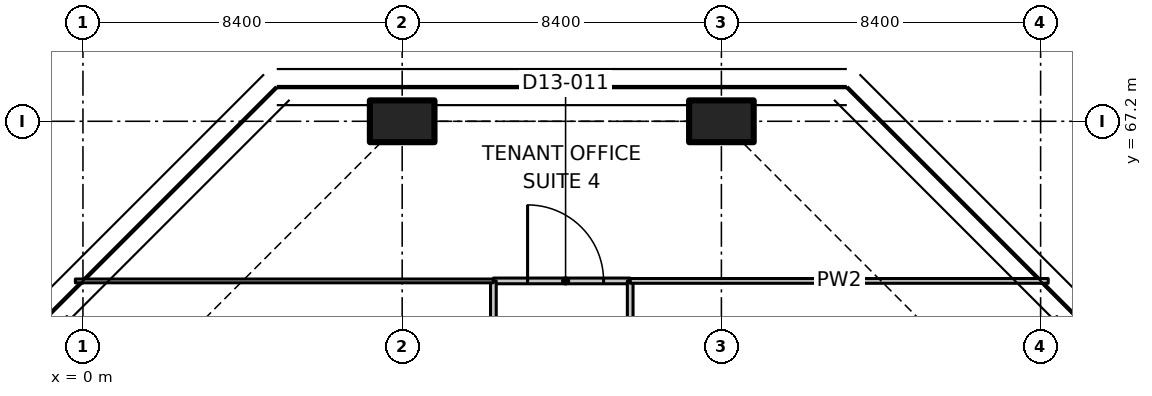
"""IFC4 building model, lengths in metres.
Left out: names, types, materials, properties, quantities, classifications, styles, units other than length and angle.
Written with IfcOpenShell. Run it as: python <this file> out.ifc"""

import sys

from ifc_helpers import new_model, si_unit, direction, frame, frame_2d, origin, origin_2d, place, context, subcontext, project, spatial, polyline, rectangle, outline, extrude, element, fill, save


model = new_model("IFC4")
c1 = context("Model", 3, precision=1e-05, world=origin(), true_north=direction((0.0, 1.0)))
c2 = subcontext(c1, "Body", "Model", "MODEL_VIEW")
j1 = project(units=[si_unit("LENGTHUNIT", "METRE"), si_unit("PLANEANGLEUNIT", "RADIAN")], contexts=[c1])
p1 = place(None, origin())
s1 = spatial("IfcSite", under=j1, at=p1, CompositionType="ELEMENT")
p2 = place(p1, origin())
s2 = spatial("IfcBuilding", under=s1, at=p2, CompositionType="ELEMENT")
p3 = place(p2, frame((0.0, 0.0, 98.9)))
s3 = spatial("IfcBuildingStorey", under=s2, at=p3, CompositionType="ELEMENT", Elevation=98.9)
for number, where, z_axis, x_axis in (
    (1, (8.4, 67.2, 0.0), (0.0, 0.0, 1.0), (0.0, 1.0, 0.0)),
    (2, (16.8, 67.2, 0.0), (0.0, 0.0, 1.0), (0.0, 1.0, 0.0)),
):
    element("IfcColumn", number, at=place(p3, frame(where, z_axis=z_axis, x_axis=x_axis)), inside=s3, PredefinedType="COLUMN", context=c2, shape_type="SweptSolid", body=[
        extrude(rectangle(XDim=1.1, YDim=1.7, at=origin_2d()), origin(), (0.0, 0.0, 1.0), 3.35),
    ])
p4 = place(p3, frame((10.8, 63.0, 0.0), z_axis=(0.0, 0.0, 1.0), x_axis=(1.0, 0.0, 0.0)))
e3 = element("IfcWall", 3, at=p4, inside=s3, PredefinedType="PARTITIONING", context=c2, shape_type="SweptSolid", body=[
    extrude(rectangle(XDim=3.6, YDim=0.15, at=frame_2d((1.8, 0.0))), origin(), (0.0, 0.0, 1.0), 3.33),
])
p5 = place(p4, frame((0.9, 0.0, 0.0)))
e4 = element("IfcOpeningElement", 4, at=p5, cuts=e3, PredefinedType="OPENING", context=c2, shape_type="SweptSolid", body=[
    extrude(rectangle(XDim=2.0, YDim=2.4, at=frame_2d((1.0, 1.2))), frame((0.0, 0.085, 0.0), z_axis=(0.0, -1.0, 0.0), x_axis=(1.0, 0.0, 0.0)), (0.0, 0.0, 1.0), 0.17),
])
p6 = place(p3, frame((10.8, 54.6, 0.0), z_axis=(0.0, 0.0, 1.0), x_axis=(0.0, 1.0, 0.0)))
e5 = element("IfcWall", 5, at=p6, inside=s3, PredefinedType="PARTITIONING", context=c2, shape_type="SweptSolid", body=[
    extrude(rectangle(XDim=8.4, YDim=0.15, at=frame_2d((4.2, 0.0))), origin(), (0.0, 0.0, 1.0), 3.33),
])
p7 = place(p6, frame((3.3, 0.0, 0.0)))
e6 = element("IfcOpeningElement", 6, at=p7, cuts=e5, PredefinedType="OPENING", context=c2, shape_type="SweptSolid", body=[
    extrude(rectangle(XDim=1.6, YDim=2.1, at=frame_2d((0.8, 1.05))), frame((0.0, 0.085, 0.0), z_axis=(0.0, -1.0, 0.0), x_axis=(1.0, 0.0, 0.0)), (0.0, 0.0, 1.0), 0.17),
])
p8 = place(p3, frame((14.4, 63.0, 0.0), z_axis=(0.0, 0.0, 1.0), x_axis=(0.0, -1.0, 0.0)))
e7 = element("IfcWall", 7, at=p8, inside=s3, PredefinedType="PARTITIONING", context=c2, shape_type="SweptSolid", body=[
    extrude(rectangle(XDim=8.4, YDim=0.15, at=frame_2d((4.2, 0.0))), origin(), (0.0, 0.0, 1.0), 3.33),
])
p9 = place(p8, frame((3.3, 0.0, 0.0)))
e8 = element("IfcOpeningElement", 8, at=p9, cuts=e7, PredefinedType="OPENING", context=c2, shape_type="SweptSolid", body=[
    extrude(rectangle(XDim=1.6, YDim=2.1, at=frame_2d((0.8, 1.05))), frame((0.0, 0.085, 0.0), z_axis=(0.0, -1.0, 0.0), x_axis=(1.0, 0.0, 0.0)), (0.0, 0.0, 1.0), 0.17),
])
p10 = place(p3, frame((10.8, 63.0, 0.0), z_axis=(0.0, 0.0, 1.0), x_axis=(-1.0, 0.0, 0.0)))
e9 = element("IfcWall", 9, at=p10, inside=s3, PredefinedType="PARTITIONING", context=c2, shape_type="SweptSolid", body=[
    extrude(outline(polyline([(0.0, 0.0), (11.0, 0.0), (11.0, 3.33), (7.266, 3.33), (7.264, 2.98), (5.936, 2.98), (5.934, 3.33), (0.0, 3.33), (0.0, 0.0)])), frame((0.0, 0.05, 0.0), z_axis=(0.0, -1.0, 0.0), x_axis=(1.0, 0.0, 0.0)), (0.0, 0.0, 1.0), 0.1),
])
p11 = place(p3, frame((25.4, 63.0, 0.0), z_axis=(0.0, 0.0, 1.0), x_axis=(-1.0, 0.0, 0.0)))
e10 = element("IfcWall", 10, at=p11, inside=s3, PredefinedType="PARTITIONING", context=c2, shape_type="SweptSolid", body=[
    extrude(outline(polyline([(0.0, 0.0), (11.0, 0.0), (11.0, 3.33), (5.078, 3.33), (5.076, 2.98), (3.724, 2.98), (3.722, 3.33), (0.0, 3.33), (0.0, 0.0)])), frame((0.0, 0.062, 0.0), z_axis=(0.0, -1.0, 0.0), x_axis=(1.0, 0.0, 0.0)), (0.0, 0.0, 1.0), 0.125),
])
p12 = place(p5, origin())
e11 = element("IfcDoor", 11, at=p12, inside=s3, OperationType="DOUBLE_DOOR_SINGLE_SWING", PredefinedType="DOOR", context=c2, shape_type="SweptSolid", body=[
    extrude(rectangle(XDim=2.0, YDim=2.4, at=frame_2d((1.0, 1.2))), frame((0.0, 0.025, 0.0), z_axis=(0.0, -1.0, 0.0), x_axis=(1.0, 0.0, 0.0)), (0.0, 0.0, 1.0), 0.05),
])
fill(e4, e11)
save(model, sys.argv[1])
